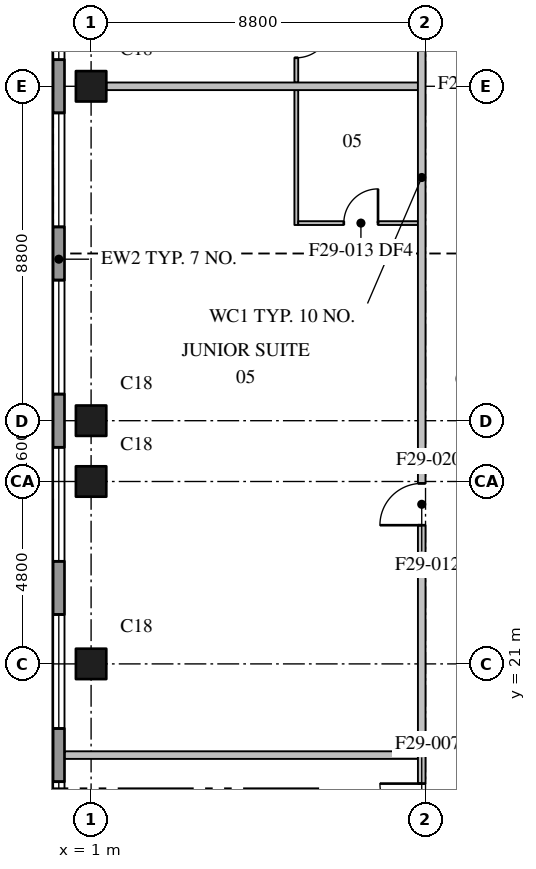
"""IFC4 building model, lengths in metres.
Left out: names, types, materials, properties, quantities, classifications, styles, units other than length and angle.
Written with IfcOpenShell. Run it as: python <this file> out.ifc"""

import sys

from ifc_helpers import new_model, si_unit, direction, frame, frame_2d, origin, origin_2d, place, context, subcontext, project, spatial, rectangle, extrude, element, fill, save


model = new_model("IFC4")
c1 = context("Model", 3, precision=1e-05, world=origin(), true_north=direction((0.0, 1.0)))
c2 = subcontext(c1, "Body", "Model", "MODEL_VIEW")
j1 = project(units=[si_unit("LENGTHUNIT", "METRE"), si_unit("PLANEANGLEUNIT", "RADIAN")], contexts=[c1])
p1 = place(None, origin())
s1 = spatial("IfcSite", under=j1, at=p1, CompositionType="ELEMENT")
p2 = place(p1, origin())
s2 = spatial("IfcBuilding", under=s1, at=p2, CompositionType="ELEMENT")
p3 = place(p2, frame((0.0, 0.0, 237.6)))
s3 = spatial("IfcBuildingStorey", under=s2, at=p3, CompositionType="ELEMENT", Elevation=237.6)
for number, where, z_axis, x_axis in (
    (1, (1.0, 21.0, 0.0), (0.0, 0.0, 1.0), (1.0, 0.0, 0.0)),
    (2, (1.0, 25.8, 0.0), (0.0, 0.0, 1.0), (1.0, 0.0, 0.0)),
    (3, (1.0, 27.4, 0.0), (0.0, 0.0, 1.0), (1.0, 0.0, 0.0)),
    (4, (1.0, 36.2, 0.0), (0.0, 0.0, 1.0), (1.0, 0.0, 0.0)),
):
    element("IfcColumn", number, at=place(p3, frame(where, z_axis=z_axis, x_axis=x_axis)), inside=s3, PredefinedType="COLUMN", context=c2, shape_type="SweptSolid", body=[
        extrude(rectangle(XDim=0.8, YDim=0.8, at=origin_2d()), origin(), (0.0, 0.0, 1.0), 3.7),
    ])
p4 = place(p3, frame((0.15, 61.1, 0.0), z_axis=(0.0, 0.0, 1.0), x_axis=(0.0, -1.0, 0.0)))
e5 = element("IfcWall", 5, at=p4, inside=s3, PredefinedType="STANDARD", context=c2, shape_type="SweptSolid", body=[
    extrude(rectangle(XDim=58.9, YDim=0.3, at=frame_2d((29.45, 0.0))), origin(), (0.0, 0.0, 1.0), 3.4),
])
p5 = place(p4, frame((3.6, 0.0, 0.75)))
e6 = element("IfcOpeningElement", 6, at=p5, cuts=e5, PredefinedType="OPENING", context=c2, shape_type="SweptSolid", body=[
    extrude(rectangle(XDim=3.0, YDim=2.3, at=frame_2d((1.5, 1.15))), frame((0.0, 0.16, 0.0), z_axis=(0.0, -1.0, 0.0), x_axis=(1.0, 0.0, 0.0)), (0.0, 0.0, 1.0), 0.32),
])
p6 = place(p4, frame((8.0, 0.0, 0.75)))
e7 = element("IfcOpeningElement", 7, at=p6, cuts=e5, PredefinedType="OPENING", context=c2, shape_type="SweptSolid", body=[
    extrude(rectangle(XDim=3.0, YDim=2.3, at=frame_2d((1.5, 1.15))), frame((0.0, 0.16, 0.0), z_axis=(0.0, -1.0, 0.0), x_axis=(1.0, 0.0, 0.0)), (0.0, 0.0, 1.0), 0.32),
])
p7 = place(p4, frame((12.4, 0.0, 0.75)))
e8 = element("IfcOpeningElement", 8, at=p7, cuts=e5, PredefinedType="OPENING", context=c2, shape_type="SweptSolid", body=[
    extrude(rectangle(XDim=3.0, YDim=2.3, at=frame_2d((1.5, 1.15))), frame((0.0, 0.16, 0.0), z_axis=(0.0, -1.0, 0.0), x_axis=(1.0, 0.0, 0.0)), (0.0, 0.0, 1.0), 0.32),
])
p8 = place(p4, frame((16.8, 0.0, 0.75)))
e9 = element("IfcOpeningElement", 9, at=p8, cuts=e5, PredefinedType="OPENING", context=c2, shape_type="SweptSolid", body=[
    extrude(rectangle(XDim=3.0, YDim=2.3, at=frame_2d((1.5, 1.15))), frame((0.0, 0.16, 0.0), z_axis=(0.0, -1.0, 0.0), x_axis=(1.0, 0.0, 0.0)), (0.0, 0.0, 1.0), 0.32),
])
p9 = place(p4, frame((21.2, 0.0, 0.75)))
e10 = element("IfcOpeningElement", 10, at=p9, cuts=e5, PredefinedType="OPENING", context=c2, shape_type="SweptSolid", body=[
    extrude(rectangle(XDim=3.0, YDim=2.3, at=frame_2d((1.5, 1.15))), frame((0.0, 0.16, 0.0), z_axis=(0.0, -1.0, 0.0), x_axis=(1.0, 0.0, 0.0)), (0.0, 0.0, 1.0), 0.32),
])
p10 = place(p4, frame((25.6, 0.0, 0.75)))
e11 = element("IfcOpeningElement", 11, at=p10, cuts=e5, PredefinedType="OPENING", context=c2, shape_type="SweptSolid", body=[
    extrude(rectangle(XDim=3.0, YDim=2.3, at=frame_2d((1.5, 1.15))), frame((0.0, 0.16, 0.0), z_axis=(0.0, -1.0, 0.0), x_axis=(1.0, 0.0, 0.0)), (0.0, 0.0, 1.0), 0.32),
])
p11 = place(p4, frame((30.0, 0.0, 0.75)))
e12 = element("IfcOpeningElement", 12, at=p11, cuts=e5, PredefinedType="OPENING", context=c2, shape_type="SweptSolid", body=[
    extrude(rectangle(XDim=3.0, YDim=2.3, at=frame_2d((1.5, 1.15))), frame((0.0, 0.16, 0.0), z_axis=(0.0, -1.0, 0.0), x_axis=(1.0, 0.0, 0.0)), (0.0, 0.0, 1.0), 0.32),
])
p12 = place(p4, frame((34.4, 0.0, 0.75)))
e13 = element("IfcOpeningElement", 13, at=p12, cuts=e5, PredefinedType="OPENING", context=c2, shape_type="SweptSolid", body=[
    extrude(rectangle(XDim=3.0, YDim=2.3, at=frame_2d((1.5, 1.15))), frame((0.0, 0.16, 0.0), z_axis=(0.0, -1.0, 0.0), x_axis=(1.0, 0.0, 0.0)), (0.0, 0.0, 1.0), 0.32),
])
p13 = place(p4, frame((38.8, 0.0, 0.75)))
e14 = element("IfcOpeningElement", 14, at=p13, cuts=e5, PredefinedType="OPENING", context=c2, shape_type="SweptSolid", body=[
    extrude(rectangle(XDim=3.0, YDim=2.3, at=frame_2d((1.5, 1.15))), frame((0.0, 0.16, 0.0), z_axis=(0.0, -1.0, 0.0), x_axis=(1.0, 0.0, 0.0)), (0.0, 0.0, 1.0), 0.32),
])
p14 = place(p4, frame((43.2, 0.0, 0.75)))
e15 = element("IfcOpeningElement", 15, at=p14, cuts=e5, PredefinedType="OPENING", context=c2, shape_type="SweptSolid", body=[
    extrude(rectangle(XDim=3.0, YDim=2.3, at=frame_2d((1.5, 1.15))), frame((0.0, 0.16, 0.0), z_axis=(0.0, -1.0, 0.0), x_axis=(1.0, 0.0, 0.0)), (0.0, 0.0, 1.0), 0.32),
])
p15 = place(p4, frame((47.6, 0.0, 0.75)))
e16 = element("IfcOpeningElement", 16, at=p15, cuts=e5, PredefinedType="OPENING", context=c2, shape_type="SweptSolid", body=[
    extrude(rectangle(XDim=3.0, YDim=2.3, at=frame_2d((1.5, 1.15))), frame((0.0, 0.16, 0.0), z_axis=(0.0, -1.0, 0.0), x_axis=(1.0, 0.0, 0.0)), (0.0, 0.0, 1.0), 0.32),
])
p16 = place(p4, frame((52.0, 0.0, 0.75)))
e17 = element("IfcOpeningElement", 17, at=p16, cuts=e5, PredefinedType="OPENING", context=c2, shape_type="SweptSolid", body=[
    extrude(rectangle(XDim=3.0, YDim=2.3, at=frame_2d((1.5, 1.15))), frame((0.0, 0.16, 0.0), z_axis=(0.0, -1.0, 0.0), x_axis=(1.0, 0.0, 0.0)), (0.0, 0.0, 1.0), 0.32),
])
p17 = place(p3, frame((9.7, 9.8, 0.0), z_axis=(0.0, 0.0, 1.0), x_axis=(0.0, 1.0, 0.0)))
e18 = element("IfcWall", 18, at=p17, inside=s3, PredefinedType="PARTITIONING", context=c2, shape_type="SweptSolid", body=[
    extrude(rectangle(XDim=48.0, YDim=0.2, at=frame_2d((24.0, 0.0))), origin(), (0.0, 0.0, 1.0), 3.4),
])
p18 = place(p17, frame((6.95, 0.0, 0.0)))
e19 = element("IfcOpeningElement", 19, at=p18, cuts=e18, PredefinedType="OPENING", context=c2, shape_type="SweptSolid", body=[
    extrude(rectangle(XDim=1.1, YDim=2.1, at=frame_2d((0.55, 1.05))), frame((0.0, 0.11, 0.0), z_axis=(0.0, -1.0, 0.0), x_axis=(1.0, 0.0, 0.0)), (0.0, 0.0, 1.0), 0.22),
])
p19 = place(p17, frame((14.85, 0.0, 0.0)))
e20 = element("IfcOpeningElement", 20, at=p19, cuts=e18, PredefinedType="OPENING", context=c2, shape_type="SweptSolid", body=[
    extrude(rectangle(XDim=1.1, YDim=2.1, at=frame_2d((0.55, 1.05))), frame((0.0, 0.11, 0.0), z_axis=(0.0, -1.0, 0.0), x_axis=(1.0, 0.0, 0.0)), (0.0, 0.0, 1.0), 0.22),
])
p20 = place(p17, frame((37.75, 0.0, 0.0)))
e21 = element("IfcOpeningElement", 21, at=p20, cuts=e18, PredefinedType="OPENING", context=c2, shape_type="SweptSolid", body=[
    extrude(rectangle(XDim=1.1, YDim=2.1, at=frame_2d((0.55, 1.05))), frame((0.0, 0.11, 0.0), z_axis=(0.0, -1.0, 0.0), x_axis=(1.0, 0.0, 0.0)), (0.0, 0.0, 1.0), 0.22),
])
p21 = place(p17, frame((41.05, 0.0, 0.0)))
e22 = element("IfcOpeningElement", 22, at=p21, cuts=e18, PredefinedType="OPENING", context=c2, shape_type="SweptSolid", body=[
    extrude(rectangle(XDim=1.1, YDim=2.1, at=frame_2d((0.55, 1.05))), frame((0.0, 0.11, 0.0), z_axis=(0.0, -1.0, 0.0), x_axis=(1.0, 0.0, 0.0)), (0.0, 0.0, 1.0), 0.22),
])
p22 = place(p3, frame((0.31, 18.6, 0.0), z_axis=(0.0, 0.0, 1.0), x_axis=(1.0, 0.0, 0.0)))
e23 = element("IfcWall", 23, at=p22, inside=s3, PredefinedType="PARTITIONING", context=c2, shape_type="SweptSolid", body=[
    extrude(rectangle(XDim=9.29, YDim=0.2, at=frame_2d((4.645, 0.0))), origin(), (0.0, 0.0, 1.0), 3.4),
])
p23 = place(p3, frame((1.4, 36.2, 0.0), z_axis=(0.0, 0.0, 1.0), x_axis=(1.0, 0.0, 0.0)))
e24 = element("IfcWall", 24, at=p23, inside=s3, PredefinedType="PARTITIONING", context=c2, shape_type="SweptSolid", body=[
    extrude(rectangle(XDim=8.2, YDim=0.2, at=frame_2d((4.1, 0.0))), origin(), (0.0, 0.0, 1.0), 3.4),
])
p24 = place(p3, frame((6.4, 32.55, 0.0), z_axis=(0.0, 0.0, 1.0), x_axis=(0.0, 1.0, 0.0)))
e25 = element("IfcWall", 25, at=p24, inside=s3, PredefinedType="PARTITIONING", context=c2, shape_type="SweptSolid", body=[
    extrude(rectangle(XDim=3.55, YDim=0.1, at=frame_2d((1.775, 0.0))), origin(), (0.0, 0.0, 1.0), 3.4),
])
p25 = place(p3, frame((6.4, 40.55, 0.0), z_axis=(0.0, 0.0, 1.0), x_axis=(0.0, -1.0, 0.0)))
e26 = element("IfcWall", 26, at=p25, inside=s3, PredefinedType="PARTITIONING", context=c2, shape_type="SweptSolid", body=[
    extrude(rectangle(XDim=4.25, YDim=0.1, at=frame_2d((2.125, 0.0))), origin(), (0.0, 0.0, 1.0), 3.4),
])
p26 = place(p25, frame((2.7, 0.0, 0.0)))
e27 = element("IfcOpeningElement", 27, at=p26, cuts=e26, PredefinedType="OPENING", context=c2, shape_type="SweptSolid", body=[
    extrude(rectangle(XDim=0.9, YDim=2.1, at=frame_2d((0.45, 1.05))), frame((0.0, 0.06, 0.0), z_axis=(0.0, -1.0, 0.0), x_axis=(1.0, 0.0, 0.0)), (0.0, 0.0, 1.0), 0.12),
])
p27 = place(p25, frame((0.55, 0.0, 0.0)))
e28 = element("IfcOpeningElement", 28, at=p27, cuts=e26, PredefinedType="OPENING", context=c2, shape_type="SweptSolid", body=[
    extrude(rectangle(XDim=0.8, YDim=2.1, at=frame_2d((0.4, 1.05))), frame((0.0, 0.06, 0.0), z_axis=(0.0, -1.0, 0.0), x_axis=(1.0, 0.0, 0.0)), (0.0, 0.0, 1.0), 0.12),
])
p28 = place(p3, frame((6.45, 32.6, 0.0), z_axis=(0.0, 0.0, 1.0), x_axis=(1.0, 0.0, 0.0)))
e29 = element("IfcWall", 29, at=p28, inside=s3, PredefinedType="PARTITIONING", context=c2, shape_type="SweptSolid", body=[
    extrude(rectangle(XDim=3.15, YDim=0.1, at=frame_2d((1.575, 0.0))), origin(), (0.0, 0.0, 1.0), 3.4),
])
p29 = place(p28, frame((1.2, 0.0, 0.0)))
e30 = element("IfcOpeningElement", 30, at=p29, cuts=e29, PredefinedType="OPENING", context=c2, shape_type="SweptSolid", body=[
    extrude(rectangle(XDim=0.9, YDim=2.1, at=frame_2d((0.45, 1.05))), frame((0.0, 0.06, 0.0), z_axis=(0.0, -1.0, 0.0), x_axis=(1.0, 0.0, 0.0)), (0.0, 0.0, 1.0), 0.12),
])
p30 = place(p9, origin())
e31 = element("IfcWindow", 31, at=p30, inside=s3, PartitioningType="SINGLE_PANEL", PredefinedType="WINDOW", context=c2, shape_type="SweptSolid", body=[
    extrude(rectangle(XDim=3.0, YDim=2.3, at=frame_2d((1.5, 1.15))), frame((0.0, 0.03, 0.0), z_axis=(0.0, -1.0, 0.0), x_axis=(1.0, 0.0, 0.0)), (0.0, 0.0, 1.0), 0.06),
])
fill(e10, e31)
p31 = place(p10, origin())
e32 = element("IfcWindow", 32, at=p31, inside=s3, PartitioningType="SINGLE_PANEL", PredefinedType="WINDOW", context=c2, shape_type="SweptSolid", body=[
    extrude(rectangle(XDim=3.0, YDim=2.3, at=frame_2d((1.5, 1.15))), frame((0.0, 0.03, 0.0), z_axis=(0.0, -1.0, 0.0), x_axis=(1.0, 0.0, 0.0)), (0.0, 0.0, 1.0), 0.06),
])
fill(e11, e32)
p32 = place(p11, origin())
e33 = element("IfcWindow", 33, at=p32, inside=s3, PartitioningType="SINGLE_PANEL", PredefinedType="WINDOW", context=c2, shape_type="SweptSolid", body=[
    extrude(rectangle(XDim=3.0, YDim=2.3, at=frame_2d((1.5, 1.15))), frame((0.0, 0.03, 0.0), z_axis=(0.0, -1.0, 0.0), x_axis=(1.0, 0.0, 0.0)), (0.0, 0.0, 1.0), 0.06),
])
fill(e12, e33)
p33 = place(p12, origin())
e34 = element("IfcWindow", 34, at=p33, inside=s3, PartitioningType="SINGLE_PANEL", PredefinedType="WINDOW", context=c2, shape_type="SweptSolid", body=[
    extrude(rectangle(XDim=3.0, YDim=2.3, at=frame_2d((1.5, 1.15))), frame((0.0, 0.03, 0.0), z_axis=(0.0, -1.0, 0.0), x_axis=(1.0, 0.0, 0.0)), (0.0, 0.0, 1.0), 0.06),
])
fill(e13, e34)
p34 = place(p13, origin())
e35 = element("IfcWindow", 35, at=p34, inside=s3, PartitioningType="SINGLE_PANEL", PredefinedType="WINDOW", context=c2, shape_type="SweptSolid", body=[
    extrude(rectangle(XDim=3.0, YDim=2.3, at=frame_2d((1.5, 1.15))), frame((0.0, 0.03, 0.0), z_axis=(0.0, -1.0, 0.0), x_axis=(1.0, 0.0, 0.0)), (0.0, 0.0, 1.0), 0.06),
])
fill(e14, e35)
p35 = place(p14, origin())
e36 = element("IfcWindow", 36, at=p35, inside=s3, PartitioningType="SINGLE_PANEL", PredefinedType="WINDOW", context=c2, shape_type="SweptSolid", body=[
    extrude(rectangle(XDim=3.0, YDim=2.3, at=frame_2d((1.5, 1.15))), frame((0.0, 0.03, 0.0), z_axis=(0.0, -1.0, 0.0), x_axis=(1.0, 0.0, 0.0)), (0.0, 0.0, 1.0), 0.06),
])
fill(e15, e36)
p36 = place(p18, origin())
e37 = element("IfcDoor", 37, at=p36, inside=s3, OperationType="SINGLE_SWING_RIGHT", PredefinedType="DOOR", context=c2, shape_type="SweptSolid", body=[
    extrude(rectangle(XDim=1.1, YDim=2.1, at=frame_2d((0.55, 1.05))), frame((0.0, 0.025, 0.0), z_axis=(0.0, -1.0, 0.0), x_axis=(1.0, 0.0, 0.0)), (0.0, 0.0, 1.0), 0.05),
])
fill(e19, e37)
p37 = place(p19, origin())
e38 = element("IfcDoor", 38, at=p37, inside=s3, OperationType="SINGLE_SWING_LEFT", PredefinedType="DOOR", context=c2, shape_type="SweptSolid", body=[
    extrude(rectangle(XDim=1.1, YDim=2.1, at=frame_2d((0.55, 1.05))), frame((0.0, 0.025, 0.0), z_axis=(0.0, -1.0, 0.0), x_axis=(1.0, 0.0, 0.0)), (0.0, 0.0, 1.0), 0.05),
])
fill(e20, e38)
p38 = place(p29, origin())
e39 = element("IfcDoor", 39, at=p38, inside=s3, OperationType="SINGLE_SWING_RIGHT", PredefinedType="DOOR", context=c2, shape_type="SweptSolid", body=[
    extrude(rectangle(XDim=0.9, YDim=2.1, at=frame_2d((0.45, 1.05))), frame((0.0, 0.025, 0.0), z_axis=(0.0, -1.0, 0.0), x_axis=(1.0, 0.0, 0.0)), (0.0, 0.0, 1.0), 0.05),
])
fill(e30, e39)
p39 = place(p26, origin())
e40 = element("IfcDoor", 40, at=p39, inside=s3, OperationType="SINGLE_SWING_LEFT", PredefinedType="DOOR", context=c2, shape_type="SweptSolid", body=[
    extrude(rectangle(XDim=0.9, YDim=2.1, at=frame_2d((0.45, 1.05))), frame((0.0, 0.025, 0.0), z_axis=(0.0, -1.0, 0.0), x_axis=(1.0, 0.0, 0.0)), (0.0, 0.0, 1.0), 0.05),
])
fill(e27, e40)
save(model, sys.argv[1])
